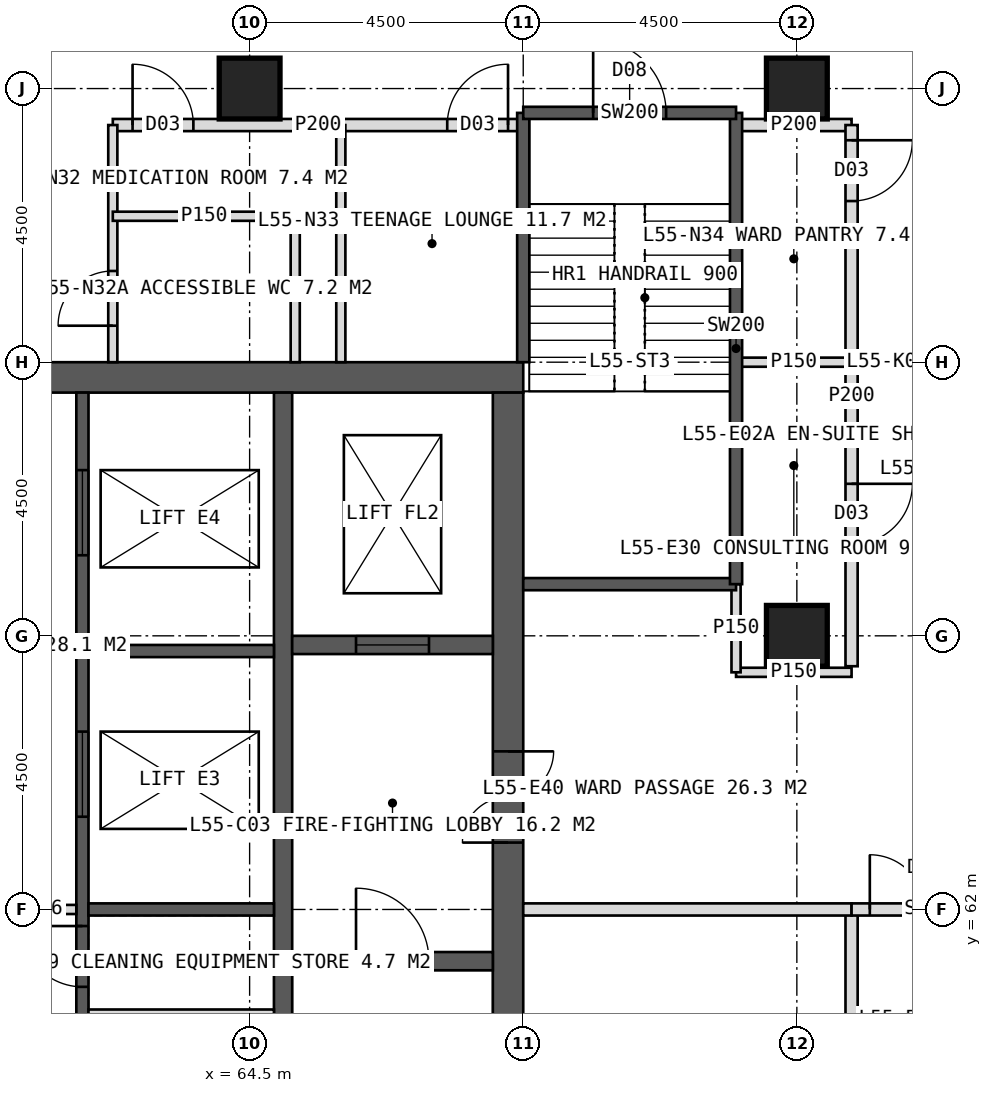
"""IFC4 building model, lengths in metres.
Left out: names, types, materials, properties, quantities, classifications, styles, units other than length and angle.
Written with IfcOpenShell. Run it as: python <this file> out.ifc"""

import sys

from ifc_helpers import new_model, si_unit, direction, frame, frame_2d, origin, origin_2d, place, context, subcontext, project, spatial, rectangle, hollow_rectangle, extrude, element, fill, save


model = new_model("IFC4")
c1 = context("Model", 3, precision=1e-05, world=origin(), true_north=direction((0.0, 1.0)))
c2 = subcontext(c1, "Body", "Model", "MODEL_VIEW")
j1 = project(units=[si_unit("LENGTHUNIT", "METRE"), si_unit("PLANEANGLEUNIT", "RADIAN")], contexts=[c1])
p1 = place(None, origin())
s1 = spatial("IfcSite", under=j1, at=p1, CompositionType="ELEMENT")
p2 = place(p1, origin())
s2 = spatial("IfcBuilding", under=s1, at=p2, CompositionType="ELEMENT")
p3 = place(p2, frame((0.0, 0.0, 229.0)))
s3 = spatial("IfcBuildingStorey", under=s2, at=p3, CompositionType="ELEMENT", Elevation=229.0)
p4 = place(p3, frame((51.0, 70.75, 0.0), z_axis=(0.0, 0.0, 1.0), x_axis=(1.0, 0.0, 0.0)))
e1 = element("IfcWall", 1, at=p4, inside=s3, PredefinedType="SHEAR", context=c2, shape_type="SweptSolid", body=[
    extrude(rectangle(XDim=18.0, YDim=0.5, at=frame_2d((9.0, 0.0))), origin(), (0.0, 0.0, 1.0), 4.0),
])
p5 = place(p4, frame((8.1, 0.0, 0.0)))
e2 = element("IfcOpeningElement", 2, at=p5, cuts=e1, PredefinedType="OPENING", context=c2, shape_type="SweptSolid", body=[
    extrude(rectangle(XDim=1.8, YDim=2.2, at=frame_2d((0.9, 1.1))), frame((0.0, 0.26, 0.0), z_axis=(0.0, -1.0, 0.0), x_axis=(1.0, 0.0, 0.0)), (0.0, 0.0, 1.0), 0.52),
])
p6 = place(p3, frame((68.75, 53.5, 0.0), z_axis=(0.0, 0.0, 1.0), x_axis=(0.0, 1.0, 0.0)))
e3 = element("IfcWall", 3, at=p6, inside=s3, PredefinedType="SHEAR", context=c2, shape_type="SweptSolid", body=[
    extrude(rectangle(XDim=17.0, YDim=0.5, at=frame_2d((8.5, 0.0))), origin(), (0.0, 0.0, 1.0), 4.0),
])
p7 = place(p6, frame((9.6, 0.0, 0.0)))
e4 = element("IfcOpeningElement", 4, at=p7, cuts=e3, PredefinedType="OPENING", context=c2, shape_type="SweptSolid", body=[
    extrude(rectangle(XDim=1.5, YDim=2.2, at=frame_2d((0.75, 1.1))), frame((0.0, 0.26, 0.0), z_axis=(0.0, -1.0, 0.0), x_axis=(1.0, 0.0, 0.0)), (0.0, 0.0, 1.0), 0.52),
])
p8 = place(p3, frame((65.05, 53.5, 0.0), z_axis=(0.0, 0.0, 1.0), x_axis=(0.0, 1.0, 0.0)))
e5 = element("IfcWall", 5, at=p8, inside=s3, PredefinedType="SHEAR", context=c2, shape_type="SweptSolid", body=[
    extrude(rectangle(XDim=17.0, YDim=0.3, at=frame_2d((8.5, 0.0))), origin(), (0.0, 0.0, 1.0), 4.0),
])
p9 = place(p3, frame((61.75, 53.5, 0.0), z_axis=(0.0, 0.0, 1.0), x_axis=(0.0, 1.0, 0.0)))
e6 = element("IfcWall", 6, at=p9, inside=s3, PredefinedType="SHEAR", context=c2, shape_type="SweptSolid", body=[
    extrude(rectangle(XDim=17.0, YDim=0.2, at=frame_2d((8.5, 0.0))), origin(), (0.0, 0.0, 1.0), 4.0),
])
p10 = place(p9, frame((0.393, 0.0, 0.0)))
e7 = element("IfcOpeningElement", 7, at=p10, cuts=e6, PredefinedType="OPENING", context=c2, shape_type="SweptSolid", body=[
    extrude(rectangle(XDim=1.0, YDim=2.1, at=frame_2d((0.5, 1.05))), frame((0.0, 0.11, 0.0), z_axis=(0.0, -1.0, 0.0), x_axis=(1.0, 0.0, 0.0)), (0.0, 0.0, 1.0), 0.22),
])
p11 = place(p9, frame((2.542, 0.0, 0.0)))
e8 = element("IfcOpeningElement", 8, at=p11, cuts=e6, PredefinedType="OPENING", context=c2, shape_type="SweptSolid", body=[
    extrude(rectangle(XDim=1.0, YDim=2.1, at=frame_2d((0.5, 1.05))), frame((0.0, 0.11, 0.0), z_axis=(0.0, -1.0, 0.0), x_axis=(1.0, 0.0, 0.0)), (0.0, 0.0, 1.0), 0.22),
])
p12 = place(p9, frame((5.127, 0.0, 0.0)))
e9 = element("IfcOpeningElement", 9, at=p12, cuts=e6, PredefinedType="OPENING", context=c2, shape_type="SweptSolid", body=[
    extrude(rectangle(XDim=1.0, YDim=2.1, at=frame_2d((0.5, 1.05))), frame((0.0, 0.11, 0.0), z_axis=(0.0, -1.0, 0.0), x_axis=(1.0, 0.0, 0.0)), (0.0, 0.0, 1.0), 0.22),
])
p13 = place(p9, frame((7.228, 0.0, 0.0)))
e10 = element("IfcOpeningElement", 10, at=p13, cuts=e6, PredefinedType="OPENING", context=c2, shape_type="SweptSolid", body=[
    extrude(rectangle(XDim=1.0, YDim=2.1, at=frame_2d((0.5, 1.05))), frame((0.0, 0.11, 0.0), z_axis=(0.0, -1.0, 0.0), x_axis=(1.0, 0.0, 0.0)), (0.0, 0.0, 1.0), 0.22),
])
p14 = place(p9, frame((10.025, 0.0, 0.0)))
e11 = element("IfcOpeningElement", 11, at=p14, cuts=e6, PredefinedType="OPENING", context=c2, shape_type="SweptSolid", body=[
    extrude(rectangle(XDim=1.4, YDim=2.2, at=frame_2d((0.7, 1.1))), frame((0.0, 0.11, 0.0), z_axis=(0.0, -1.0, 0.0), x_axis=(1.0, 0.0, 0.0)), (0.0, 0.0, 1.0), 0.22),
])
p15 = place(p9, frame((14.325, 0.0, 0.0)))
e12 = element("IfcOpeningElement", 12, at=p15, cuts=e6, PredefinedType="OPENING", context=c2, shape_type="SweptSolid", body=[
    extrude(rectangle(XDim=1.4, YDim=2.2, at=frame_2d((0.7, 1.1))), frame((0.0, 0.11, 0.0), z_axis=(0.0, -1.0, 0.0), x_axis=(1.0, 0.0, 0.0)), (0.0, 0.0, 1.0), 0.22),
])
for number, where, z_axis, x_axis in (
    (13, (61.85, 62.0, 0.0), (0.0, 0.0, 1.0), (1.0, 0.0, 0.0)),
    (14, (61.85, 66.25, 0.0), (0.0, 0.0, 1.0), (1.0, 0.0, 0.0)),
):
    element("IfcWall", number, at=place(p3, frame(where, z_axis=z_axis, x_axis=x_axis)), inside=s3, PredefinedType="SHEAR", context=c2, shape_type="SweptSolid", body=[
        extrude(rectangle(XDim=3.05, YDim=0.2, at=frame_2d((1.525, 0.0))), origin(), (0.0, 0.0, 1.0), 4.0),
    ])
p16 = place(p3, frame((65.2, 61.15, 0.0), z_axis=(0.0, 0.0, 1.0), x_axis=(1.0, 0.0, 0.0)))
e15 = element("IfcWall", 15, at=p16, inside=s3, PredefinedType="SHEAR", context=c2, shape_type="SweptSolid", body=[
    extrude(rectangle(XDim=3.3, YDim=0.3, at=frame_2d((1.65, 0.0))), origin(), (0.0, 0.0, 1.0), 4.0),
])
p17 = place(p16, frame((1.05, 0.0, 0.0)))
e16 = element("IfcOpeningElement", 16, at=p17, cuts=e15, PredefinedType="OPENING", context=c2, shape_type="SweptSolid", body=[
    extrude(rectangle(XDim=1.2, YDim=2.1, at=frame_2d((0.6, 1.05))), frame((0.0, 0.16, 0.0), z_axis=(0.0, -1.0, 0.0), x_axis=(1.0, 0.0, 0.0)), (0.0, 0.0, 1.0), 0.32),
])
p18 = place(p3, frame((65.2, 66.35, 0.0), z_axis=(0.0, 0.0, 1.0), x_axis=(1.0, 0.0, 0.0)))
e17 = element("IfcWall", 17, at=p18, inside=s3, PredefinedType="SHEAR", context=c2, shape_type="SweptSolid", body=[
    extrude(rectangle(XDim=3.3, YDim=0.3, at=frame_2d((1.65, 0.0))), origin(), (0.0, 0.0, 1.0), 4.0),
])
p19 = place(p18, frame((1.05, 0.0, 0.0)))
e18 = element("IfcOpeningElement", 18, at=p19, cuts=e17, PredefinedType="OPENING", context=c2, shape_type="SweptSolid", body=[
    extrude(rectangle(XDim=1.2, YDim=2.2, at=frame_2d((0.6, 1.1))), frame((0.0, 0.16, 0.0), z_axis=(0.0, -1.0, 0.0), x_axis=(1.0, 0.0, 0.0)), (0.0, 0.0, 1.0), 0.32),
])
for number, where, z_axis, x_axis in (
    (19, (73.5, 75.5, 0.0), (0.0, 0.0, 1.0), (1.0, 0.0, 0.0)),
    (20, (64.5, 75.5, 0.0), (0.0, 0.0, 1.0), (1.0, 0.0, 0.0)),
    (21, (73.5, 66.5, 0.0), (0.0, 0.0, 1.0), (1.0, 0.0, 0.0)),
):
    element("IfcColumn", number, at=place(p3, frame(where, z_axis=z_axis, x_axis=x_axis)), inside=s3, PredefinedType="COLUMN", context=c2, shape_type="SweptSolid", body=[
        extrude(hollow_rectangle(XDim=1.0, YDim=1.0, WallThickness=0.1, at=origin_2d()), origin(), (0.0, 0.0, 1.0), 4.0),
    ])
p20 = place(p3, frame((62.25, 74.9, 0.0), z_axis=(0.0, 0.0, 1.0), x_axis=(1.0, 0.0, 0.0)))
e22 = element("IfcWall", 22, at=p20, inside=s3, PredefinedType="PARTITIONING", context=c2, shape_type="SweptSolid", body=[
    extrude(rectangle(XDim=6.75, YDim=0.2, at=frame_2d((3.375, 0.0))), origin(), (0.0, 0.0, 1.0), 3.75),
])
p21 = place(p20, frame((0.325, 0.0, 0.0)))
e23 = element("IfcOpeningElement", 23, at=p21, cuts=e22, PredefinedType="OPENING", context=c2, shape_type="SweptSolid", body=[
    extrude(rectangle(XDim=1.0, YDim=2.1, at=frame_2d((0.5, 1.05))), frame((0.0, 0.11, 0.0), z_axis=(0.0, -1.0, 0.0), x_axis=(1.0, 0.0, 0.0)), (0.0, 0.0, 1.0), 0.22),
])
p22 = place(p20, frame((5.5, 0.0, 0.0)))
e24 = element("IfcOpeningElement", 24, at=p22, cuts=e22, PredefinedType="OPENING", context=c2, shape_type="SweptSolid", body=[
    extrude(rectangle(XDim=1.0, YDim=2.1, at=frame_2d((0.5, 1.05))), frame((0.0, 0.11, 0.0), z_axis=(0.0, -1.0, 0.0), x_axis=(1.0, 0.0, 0.0)), (0.0, 0.0, 1.0), 0.22),
])
p23 = place(p3, frame((72.5, 74.9, 0.0), z_axis=(0.0, 0.0, 1.0), x_axis=(1.0, 0.0, 0.0)))
e25 = element("IfcWall", 25, at=p23, inside=s3, PredefinedType="PARTITIONING", context=c2, shape_type="SweptSolid", body=[
    extrude(rectangle(XDim=1.9, YDim=0.2, at=frame_2d((0.95, 0.0))), origin(), (0.0, 0.0, 1.0), 3.75),
])
p24 = place(p3, frame((62.25, 71.0, 0.0), z_axis=(0.0, 0.0, 1.0), x_axis=(0.0, 1.0, 0.0)))
e26 = element("IfcWall", 26, at=p24, inside=s3, PredefinedType="PARTITIONING", context=c2, shape_type="SweptSolid", body=[
    extrude(rectangle(XDim=3.9, YDim=0.15, at=frame_2d((1.95, 0.0))), origin(), (0.0, 0.0, 1.0), 3.75),
])
p25 = place(p24, frame((0.6, 0.0, 0.0)))
e27 = element("IfcOpeningElement", 27, at=p25, cuts=e26, PredefinedType="OPENING", context=c2, shape_type="SweptSolid", body=[
    extrude(rectangle(XDim=0.9, YDim=2.1, at=frame_2d((0.45, 1.05))), frame((0.0, 0.085, 0.0), z_axis=(0.0, -1.0, 0.0), x_axis=(1.0, 0.0, 0.0)), (0.0, 0.0, 1.0), 0.17),
])
p26 = place(p3, frame((66.0, 71.0, 0.0), z_axis=(0.0, 0.0, 1.0), x_axis=(0.0, 1.0, 0.0)))
e28 = element("IfcWall", 28, at=p26, inside=s3, PredefinedType="PARTITIONING", context=c2, shape_type="SweptSolid", body=[
    extrude(rectangle(XDim=3.9, YDim=0.15, at=frame_2d((1.95, 0.0))), origin(), (0.0, 0.0, 1.0), 3.75),
])
p27 = place(p3, frame((62.25, 73.4, 0.0), z_axis=(0.0, 0.0, 1.0), x_axis=(1.0, 0.0, 0.0)))
e29 = element("IfcWall", 29, at=p27, inside=s3, PredefinedType="PARTITIONING", context=c2, shape_type="SweptSolid", body=[
    extrude(rectangle(XDim=3.0, YDim=0.15, at=frame_2d((1.5, 0.0))), origin(), (0.0, 0.0, 1.0), 3.75),
])
p28 = place(p3, frame((65.25, 71.0, 0.0), z_axis=(0.0, 0.0, 1.0), x_axis=(0.0, 1.0, 0.0)))
e30 = element("IfcWall", 30, at=p28, inside=s3, PredefinedType="PARTITIONING", context=c2, shape_type="SweptSolid", body=[
    extrude(rectangle(XDim=2.4, YDim=0.15, at=frame_2d((1.2, 0.0))), origin(), (0.0, 0.0, 1.0), 3.75),
])
p29 = place(p3, frame((72.5, 71.0, 0.0), z_axis=(0.0, 0.0, 1.0), x_axis=(1.0, 0.0, 0.0)))
e31 = element("IfcWall", 31, at=p29, inside=s3, PredefinedType="PARTITIONING", context=c2, shape_type="SweptSolid", body=[
    extrude(rectangle(XDim=1.9, YDim=0.15, at=frame_2d((0.95, 0.0))), origin(), (0.0, 0.0, 1.0), 3.75),
])
p30 = place(p3, frame((74.4, 74.9, 0.0), z_axis=(0.0, 0.0, 1.0), x_axis=(0.0, -1.0, 0.0)))
e32 = element("IfcWall", 32, at=p30, inside=s3, PredefinedType="PARTITIONING", context=c2, shape_type="SweptSolid", body=[
    extrude(rectangle(XDim=8.9, YDim=0.2, at=frame_2d((4.45, 0.0))), origin(), (0.0, 0.0, 1.0), 3.75),
])
p31 = place(p30, frame((0.25, 0.0, 0.0)))
e33 = element("IfcOpeningElement", 33, at=p31, cuts=e32, PredefinedType="OPENING", context=c2, shape_type="SweptSolid", body=[
    extrude(rectangle(XDim=1.0, YDim=2.1, at=frame_2d((0.5, 1.05))), frame((0.0, 0.11, 0.0), z_axis=(0.0, -1.0, 0.0), x_axis=(1.0, 0.0, 0.0)), (0.0, 0.0, 1.0), 0.22),
])
p32 = place(p30, frame((5.9, 0.0, 0.0)))
e34 = element("IfcOpeningElement", 34, at=p32, cuts=e32, PredefinedType="OPENING", context=c2, shape_type="SweptSolid", body=[
    extrude(rectangle(XDim=1.0, YDim=2.1, at=frame_2d((0.5, 1.05))), frame((0.0, 0.11, 0.0), z_axis=(0.0, -1.0, 0.0), x_axis=(1.0, 0.0, 0.0)), (0.0, 0.0, 1.0), 0.22),
])
p33 = place(p3, frame((74.4, 62.0, 0.0), z_axis=(0.0, 0.0, 1.0), x_axis=(0.0, -1.0, 0.0)))
e35 = element("IfcWall", 35, at=p33, inside=s3, PredefinedType="PARTITIONING", context=c2, shape_type="SweptSolid", body=[
    extrude(rectangle(XDim=14.4, YDim=0.2, at=frame_2d((7.2, 0.0))), origin(), (0.0, 0.0, 1.0), 3.75),
])
p34 = place(p33, frame((2.5, 0.0, 0.0)))
e36 = element("IfcOpeningElement", 36, at=p34, cuts=e35, PredefinedType="OPENING", context=c2, shape_type="SweptSolid", body=[
    extrude(rectangle(XDim=1.0, YDim=2.1, at=frame_2d((0.5, 1.05))), frame((0.0, 0.11, 0.0), z_axis=(0.0, -1.0, 0.0), x_axis=(1.0, 0.0, 0.0)), (0.0, 0.0, 1.0), 0.22),
])
p35 = place(p33, frame((7.0, 0.0, 0.0)))
e37 = element("IfcOpeningElement", 37, at=p35, cuts=e35, PredefinedType="OPENING", context=c2, shape_type="SweptSolid", body=[
    extrude(rectangle(XDim=1.0, YDim=2.1, at=frame_2d((0.5, 1.05))), frame((0.0, 0.11, 0.0), z_axis=(0.0, -1.0, 0.0), x_axis=(1.0, 0.0, 0.0)), (0.0, 0.0, 1.0), 0.22),
])
p36 = place(p33, frame((11.2, 0.0, 0.0)))
e38 = element("IfcOpeningElement", 38, at=p36, cuts=e35, PredefinedType="OPENING", context=c2, shape_type="SweptSolid", body=[
    extrude(rectangle(XDim=1.0, YDim=2.1, at=frame_2d((0.5, 1.05))), frame((0.0, 0.11, 0.0), z_axis=(0.0, -1.0, 0.0), x_axis=(1.0, 0.0, 0.0)), (0.0, 0.0, 1.0), 0.22),
])
p37 = place(p3, frame((72.5, 65.9, 0.0), z_axis=(0.0, 0.0, 1.0), x_axis=(1.0, 0.0, 0.0)))
e39 = element("IfcWall", 39, at=p37, inside=s3, PredefinedType="PARTITIONING", context=c2, shape_type="SweptSolid", body=[
    extrude(rectangle(XDim=1.9, YDim=0.15, at=frame_2d((0.95, 0.0))), origin(), (0.0, 0.0, 1.0), 3.75),
])
p38 = place(p3, frame((69.0, 62.0, 0.0), z_axis=(0.0, 0.0, 1.0), x_axis=(1.0, 0.0, 0.0)))
e40 = element("IfcWall", 40, at=p38, inside=s3, PredefinedType="SOLIDWALL", context=c2, shape_type="SweptSolid", body=[
    extrude(rectangle(XDim=5.4, YDim=0.2, at=frame_2d((2.7, 0.0))), origin(), (0.0, 0.0, 1.0), 2.95),
])
p39 = place(p3, frame((74.4, 62.0, 0.0), z_axis=(0.0, 0.0, 1.0), x_axis=(1.0, 0.0, 0.0)))
e41 = element("IfcWall", 41, at=p39, inside=s3, PredefinedType="SOLIDWALL", context=c2, shape_type="SweptSolid", body=[
    extrude(rectangle(XDim=2.7, YDim=0.2, at=frame_2d((1.35, 0.0))), origin(), (0.0, 0.0, 1.0), 2.95),
])
p40 = place(p39, frame((0.3, 0.0, 0.0)))
e42 = element("IfcOpeningElement", 42, at=p40, cuts=e41, PredefinedType="OPENING", context=c2, shape_type="SweptSolid", body=[
    extrude(rectangle(XDim=1.8, YDim=2.2, at=frame_2d((0.9, 1.1))), frame((0.0, 0.11, 0.0), z_axis=(0.0, -1.0, 0.0), x_axis=(1.0, 0.0, 0.0)), (0.0, 0.0, 1.0), 0.22),
])
p41 = place(p3, frame((61.85, 60.28, 0.0), z_axis=(0.0, 0.0, 1.0), x_axis=(1.0, 0.0, 0.0)))
e43 = element("IfcWall", 43, at=p41, inside=s3, PredefinedType="PARTITIONING", context=c2, shape_type="SweptSolid", body=[
    extrude(rectangle(XDim=3.05, YDim=0.15, at=frame_2d((1.525, 0.0))), origin(), (0.0, 0.0, 1.0), 3.75),
])
p42 = place(p3, frame((58.35, 62.0, 0.0), z_axis=(0.0, 0.0, 1.0), x_axis=(1.0, 0.0, 0.0)))
e44 = element("IfcWall", 44, at=p42, inside=s3, PredefinedType="PARTITIONING", context=c2, shape_type="SweptSolid", body=[
    extrude(rectangle(XDim=3.3, YDim=0.15, at=frame_2d((1.65, 0.0))), origin(), (0.0, 0.0, 1.0), 3.75),
])
p43 = place(p3, frame((72.5, 65.9, 0.0), z_axis=(0.0, 0.0, 1.0), x_axis=(0.0, 1.0, 0.0)))
e45 = element("IfcWall", 45, at=p43, inside=s3, PredefinedType="PARTITIONING", context=c2, shape_type="SweptSolid", body=[
    extrude(rectangle(XDim=1.45, YDim=0.15, at=frame_2d((0.725, 0.0))), origin(), (0.0, 0.0, 1.0), 3.75),
])
p44 = place(p3, frame((69.0, 71.0, 0.0), z_axis=(0.0, 0.0, 1.0), x_axis=(0.0, 1.0, 0.0)))
e46 = element("IfcWall", 46, at=p44, inside=s3, PredefinedType="SOLIDWALL", context=c2, shape_type="SweptSolid", body=[
    extrude(rectangle(XDim=4.1, YDim=0.2, at=frame_2d((2.05, 0.0))), origin(), (0.0, 0.0, 1.0), 3.75),
])
p45 = place(p3, frame((69.0, 67.35, 0.0), z_axis=(0.0, 0.0, 1.0), x_axis=(1.0, 0.0, 0.0)))
e47 = element("IfcWall", 47, at=p45, inside=s3, PredefinedType="SOLIDWALL", context=c2, shape_type="SweptSolid", body=[
    extrude(rectangle(XDim=3.5, YDim=0.2, at=frame_2d((1.75, 0.0))), origin(), (0.0, 0.0, 1.0), 3.75),
])
p46 = place(p3, frame((72.5, 67.35, 0.0), z_axis=(0.0, 0.0, 1.0), x_axis=(0.0, 1.0, 0.0)))
e48 = element("IfcWall", 48, at=p46, inside=s3, PredefinedType="SOLIDWALL", context=c2, shape_type="SweptSolid", body=[
    extrude(rectangle(XDim=7.75, YDim=0.2, at=frame_2d((3.875, 0.0))), origin(), (0.0, 0.0, 1.0), 3.75),
])
p47 = place(p3, frame((69.0, 75.1, 0.0), z_axis=(0.0, 0.0, 1.0), x_axis=(1.0, 0.0, 0.0)))
e49 = element("IfcWall", 49, at=p47, inside=s3, PredefinedType="SOLIDWALL", context=c2, shape_type="SweptSolid", body=[
    extrude(rectangle(XDim=3.5, YDim=0.2, at=frame_2d((1.75, 0.0))), origin(), (0.0, 0.0, 1.0), 3.75),
])
p48 = place(p47, frame((1.15, 0.0, 0.0)))
e50 = element("IfcOpeningElement", 50, at=p48, cuts=e49, PredefinedType="OPENING", context=c2, shape_type="SweptSolid", body=[
    extrude(rectangle(XDim=1.2, YDim=2.1, at=frame_2d((0.6, 1.05))), frame((0.0, 0.11, 0.0), z_axis=(0.0, -1.0, 0.0), x_axis=(1.0, 0.0, 0.0)), (0.0, 0.0, 1.0), 0.22),
])
p49 = place(p25, origin())
e51 = element("IfcDoor", 51, at=p49, inside=s3, OperationType="SINGLE_SWING_LEFT", PredefinedType="DOOR", context=c2, shape_type="SweptSolid", body=[
    extrude(rectangle(XDim=0.9, YDim=2.1, at=frame_2d((0.45, 1.05))), frame((0.0, 0.025, 0.0), z_axis=(0.0, -1.0, 0.0), x_axis=(1.0, 0.0, 0.0)), (0.0, 0.0, 1.0), 0.05),
])
fill(e27, e51)
p50 = place(p21, origin())
e52 = element("IfcDoor", 52, at=p50, inside=s3, OperationType="SINGLE_SWING_LEFT", PredefinedType="DOOR", context=c2, shape_type="SweptSolid", body=[
    extrude(rectangle(XDim=1.0, YDim=2.1, at=frame_2d((0.5, 1.05))), frame((0.0, 0.025, 0.0), z_axis=(0.0, -1.0, 0.0), x_axis=(1.0, 0.0, 0.0)), (0.0, 0.0, 1.0), 0.05),
])
fill(e23, e52)
p51 = place(p22, origin())
e53 = element("IfcDoor", 53, at=p51, inside=s3, OperationType="SINGLE_SWING_RIGHT", PredefinedType="DOOR", context=c2, shape_type="SweptSolid", body=[
    extrude(rectangle(XDim=1.0, YDim=2.1, at=frame_2d((0.5, 1.05))), frame((0.0, 0.025, 0.0), z_axis=(0.0, -1.0, 0.0), x_axis=(1.0, 0.0, 0.0)), (0.0, 0.0, 1.0), 0.05),
])
fill(e24, e53)
p52 = place(p31, origin())
e54 = element("IfcDoor", 54, at=p52, inside=s3, OperationType="SINGLE_SWING_LEFT", PredefinedType="DOOR", context=c2, shape_type="SweptSolid", body=[
    extrude(rectangle(XDim=1.0, YDim=2.1, at=frame_2d((0.5, 1.05))), frame((0.0, 0.025, 0.0), z_axis=(0.0, -1.0, 0.0), x_axis=(1.0, 0.0, 0.0)), (0.0, 0.0, 1.0), 0.05),
])
fill(e33, e54)
p53 = place(p32, origin())
e55 = element("IfcDoor", 55, at=p53, inside=s3, OperationType="SINGLE_SWING_LEFT", PredefinedType="DOOR", context=c2, shape_type="SweptSolid", body=[
    extrude(rectangle(XDim=1.0, YDim=2.1, at=frame_2d((0.5, 1.05))), frame((0.0, 0.025, 0.0), z_axis=(0.0, -1.0, 0.0), x_axis=(1.0, 0.0, 0.0)), (0.0, 0.0, 1.0), 0.05),
])
fill(e34, e55)
p54 = place(p40, origin())
e56 = element("IfcDoor", 56, at=p54, inside=s3, OperationType="DOUBLE_DOOR_DOUBLE_SWING", PredefinedType="DOOR", context=c2, shape_type="SweptSolid", body=[
    extrude(rectangle(XDim=1.8, YDim=2.2, at=frame_2d((0.9, 1.1))), frame((0.0, 0.025, 0.0), z_axis=(0.0, -1.0, 0.0), x_axis=(1.0, 0.0, 0.0)), (0.0, 0.0, 1.0), 0.05),
])
fill(e42, e56)
p55 = place(p7, origin())
e57 = element("IfcDoor", 57, at=p55, inside=s3, OperationType="DOUBLE_DOOR_SINGLE_SWING", PredefinedType="DOOR", context=c2, shape_type="SweptSolid", body=[
    extrude(rectangle(XDim=1.5, YDim=2.2, at=frame_2d((0.75, 1.1))), frame((0.0, 0.025, 0.0), z_axis=(0.0, -1.0, 0.0), x_axis=(1.0, 0.0, 0.0)), (0.0, 0.0, 1.0), 0.05),
])
fill(e4, e57)
p56 = place(p17, origin())
e58 = element("IfcDoor", 58, at=p56, inside=s3, OperationType="SINGLE_SWING_LEFT", PredefinedType="DOOR", context=c2, shape_type="SweptSolid", body=[
    extrude(rectangle(XDim=1.2, YDim=2.1, at=frame_2d((0.6, 1.05))), frame((0.0, 0.025, 0.0), z_axis=(0.0, -1.0, 0.0), x_axis=(1.0, 0.0, 0.0)), (0.0, 0.0, 1.0), 0.05),
])
fill(e16, e58)
p57 = place(p19, origin())
e59 = element("IfcDoor", 59, at=p57, inside=s3, OperationType="SLIDING_TO_LEFT", PredefinedType="DOOR", context=c2, shape_type="SweptSolid", body=[
    extrude(rectangle(XDim=1.2, YDim=2.2, at=frame_2d((0.6, 1.1))), frame((0.0, 0.025, 0.0), z_axis=(0.0, -1.0, 0.0), x_axis=(1.0, 0.0, 0.0)), (0.0, 0.0, 1.0), 0.05),
])
fill(e18, e59)
p58 = place(p13, origin())
e60 = element("IfcDoor", 60, at=p58, inside=s3, OperationType="SINGLE_SWING_RIGHT", PredefinedType="DOOR", context=c2, shape_type="SweptSolid", body=[
    extrude(rectangle(XDim=1.0, YDim=2.1, at=frame_2d((0.5, 1.05))), frame((0.0, 0.025, 0.0), z_axis=(0.0, -1.0, 0.0), x_axis=(1.0, 0.0, 0.0)), (0.0, 0.0, 1.0), 0.05),
])
fill(e10, e60)
p59 = place(p14, origin())
e61 = element("IfcDoor", 61, at=p59, inside=s3, OperationType="SLIDING_TO_LEFT", PredefinedType="DOOR", context=c2, shape_type="SweptSolid", body=[
    extrude(rectangle(XDim=1.4, YDim=2.2, at=frame_2d((0.7, 1.1))), frame((0.0, 0.025, 0.0), z_axis=(0.0, -1.0, 0.0), x_axis=(1.0, 0.0, 0.0)), (0.0, 0.0, 1.0), 0.05),
])
fill(e11, e61)
p60 = place(p15, origin())
e62 = element("IfcDoor", 62, at=p60, inside=s3, OperationType="SLIDING_TO_LEFT", PredefinedType="DOOR", context=c2, shape_type="SweptSolid", body=[
    extrude(rectangle(XDim=1.4, YDim=2.2, at=frame_2d((0.7, 1.1))), frame((0.0, 0.025, 0.0), z_axis=(0.0, -1.0, 0.0), x_axis=(1.0, 0.0, 0.0)), (0.0, 0.0, 1.0), 0.05),
])
fill(e12, e62)
p61 = place(p48, origin())
e63 = element("IfcDoor", 63, at=p61, inside=s3, OperationType="SINGLE_SWING_LEFT", PredefinedType="DOOR", context=c2, shape_type="SweptSolid", body=[
    extrude(rectangle(XDim=1.2, YDim=2.1, at=frame_2d((0.6, 1.05))), frame((0.0, 0.025, 0.0), z_axis=(0.0, -1.0, 0.0), x_axis=(1.0, 0.0, 0.0)), (0.0, 0.0, 1.0), 0.05),
])
fill(e50, e63)
save(model, sys.argv[1])
